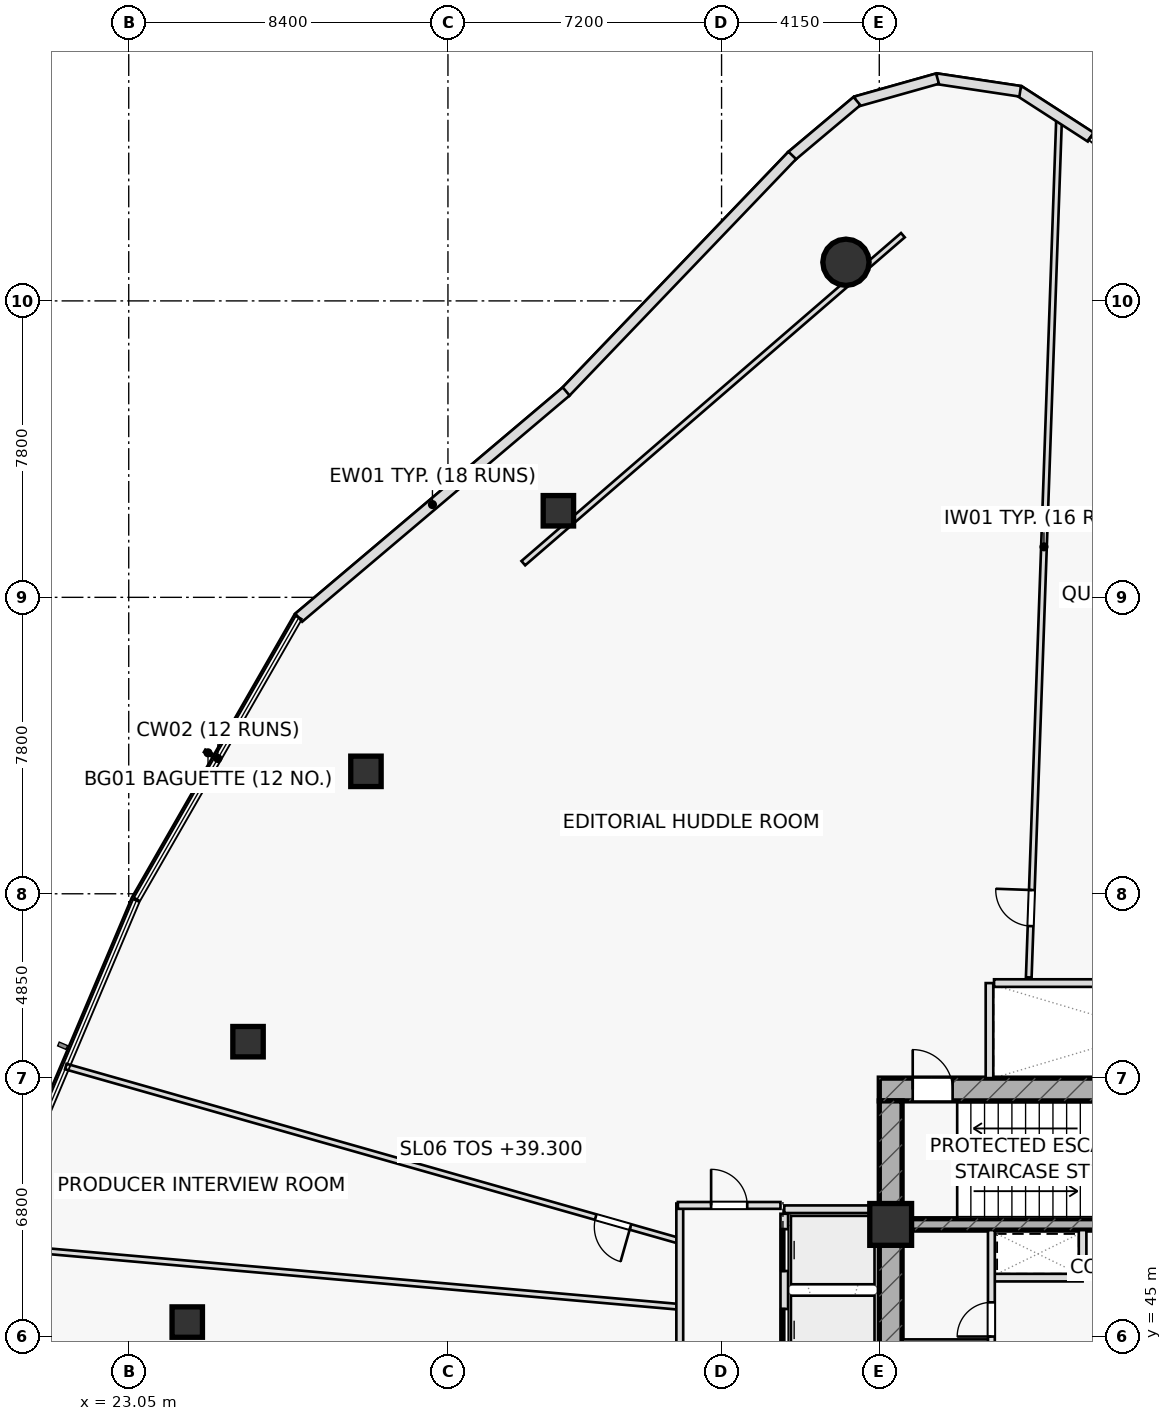
"""IFC4 building model, lengths in metres.
Left out: names, types, materials, properties, quantities, classifications, styles, units other than length and angle.
Written with IfcOpenShell. Run it as: python <this file> out.ifc"""

import sys

from ifc_helpers import new_model, si_unit, direction, frame, frame_2d, origin, origin_2d, place, context, subcontext, project, spatial, rectangle, hollow_rectangle, hollow_circle, extrude, element, fill, save


model = new_model("IFC4")
c1 = context("Model", 3, precision=1e-05, world=origin(), true_north=direction((0.0, 1.0)))
c2 = subcontext(c1, "Body", "Model", "MODEL_VIEW")
j1 = project(units=[si_unit("LENGTHUNIT", "METRE"), si_unit("PLANEANGLEUNIT", "RADIAN")], contexts=[c1])
p1 = place(None, origin())
s1 = spatial("IfcSite", under=j1, at=p1, CompositionType="ELEMENT")
p2 = place(p1, origin())
s2 = spatial("IfcBuilding", under=s1, at=p2, CompositionType="ELEMENT")
p3 = place(p2, frame((0.0, 0.0, 39.3)))
s3 = spatial("IfcBuildingStorey", under=s2, at=p3, CompositionType="ELEMENT", Elevation=39.3)
p4 = place(p3, frame((42.8, 51.5, 0.0), z_axis=(0.0, 0.0, 1.0), x_axis=(1.0, 0.0, 0.0)))
e1 = element("IfcWall", 1, at=p4, inside=s3, PredefinedType="SHEAR", context=c2, shape_type="SweptSolid", body=[
    extrude(rectangle(XDim=14.4, YDim=0.6, at=frame_2d((7.2, 0.0))), origin(), (0.0, 0.0, 1.0), 3.6),
])
p5 = place(p4, frame((0.88, 0.0, 0.0)))
e2 = element("IfcOpeningElement", 2, at=p5, cuts=e1, PredefinedType="OPENING", context=c2, shape_type="SweptSolid", body=[
    extrude(rectangle(XDim=1.05, YDim=2.2, at=frame_2d((0.525, 1.1))), frame((0.0, 0.31, 0.0), z_axis=(0.0, -1.0, 0.0), x_axis=(1.0, 0.0, 0.0)), (0.0, 0.0, 1.0), 0.62),
])
p6 = place(p3, frame((43.1, 38.8, 0.0), z_axis=(0.0, 0.0, 1.0), x_axis=(0.0, 1.0, 0.0)))
e3 = element("IfcWall", 3, at=p6, inside=s3, PredefinedType="SHEAR", context=c2, shape_type="SweptSolid", body=[
    extrude(rectangle(XDim=12.4, YDim=0.6, at=frame_2d((6.2, 0.0))), origin(), (0.0, 0.0, 1.0), 3.6),
])
p7 = place(p3, frame((43.4, 47.95, 0.0), z_axis=(0.0, 0.0, 1.0), x_axis=(1.0, 0.0, 0.0)))
e4 = element("IfcWall", 4, at=p7, inside=s3, PredefinedType="SHEAR", context=c2, shape_type="SweptSolid", body=[
    extrude(rectangle(XDim=13.2, YDim=0.3, at=frame_2d((6.6, 0.0))), origin(), (0.0, 0.0, 1.0), 3.6),
])
p8 = place(p7, frame((8.345, 0.0, 0.0)))
e5 = element("IfcOpeningElement", 5, at=p8, cuts=e4, PredefinedType="OPENING", context=c2, shape_type="SweptSolid", body=[
    extrude(rectangle(XDim=1.15, YDim=2.2, at=frame_2d((0.575, 1.1))), frame((0.0, 0.16, 0.0), z_axis=(0.0, -1.0, 0.0), x_axis=(1.0, 0.0, 0.0)), (0.0, 0.0, 1.0), 0.32),
])
p9 = place(p7, frame((10.065, 0.0, 0.0)))
e6 = element("IfcOpeningElement", 6, at=p9, cuts=e4, PredefinedType="OPENING", context=c2, shape_type="SweptSolid", body=[
    extrude(rectangle(XDim=1.15, YDim=2.2, at=frame_2d((0.575, 1.1))), frame((0.0, 0.16, 0.0), z_axis=(0.0, -1.0, 0.0), x_axis=(1.0, 0.0, 0.0)), (0.0, 0.0, 1.0), 0.32),
])
p10 = place(p7, frame((11.645, 0.0, 0.0)))
e7 = element("IfcOpeningElement", 7, at=p10, cuts=e4, PredefinedType="OPENING", context=c2, shape_type="SweptSolid", body=[
    extrude(rectangle(XDim=1.15, YDim=2.2, at=frame_2d((0.575, 1.1))), frame((0.0, 0.16, 0.0), z_axis=(0.0, -1.0, 0.0), x_axis=(1.0, 0.0, 0.0)), (0.0, 0.0, 1.0), 0.32),
])
p11 = place(p3, frame((43.1, 47.95, 0.0), z_axis=(0.0, 0.0, 1.0), x_axis=(1.0, 0.0, 0.0)))
e8 = element("IfcColumn", 8, at=p11, inside=s3, PredefinedType="COLUMN", context=c2, shape_type="SweptSolid", body=[
    extrude(rectangle(XDim=1.1, YDim=1.1, at=origin_2d()), origin(), (0.0, 0.0, 1.0), 3.6),
])
p12 = place(p3, frame((41.923, 73.266, 0.0), z_axis=(0.0, 0.0, 1.0), x_axis=(1.0, 0.0, 0.0)))
e9 = element("IfcColumn", 9, at=p12, inside=s3, PredefinedType="COLUMN", context=c2, shape_type="SweptSolid", body=[
    extrude(hollow_circle(Radius=0.61, WallThickness=0.05, at=origin_2d()), origin(), (0.0, 0.0, 1.0), 3.6),
])
for number, where, z_axis, x_axis in (
    (10, (34.356, 66.728, 0.0), (0.0, 0.0, 1.0), (1.0, 0.0, 0.0)),
    (11, (29.292, 59.872, 0.0), (0.0, 0.0, 1.0), (1.0, 0.0, 0.0)),
    (12, (26.189, 52.758, 0.0), (0.0, 0.0, 1.0), (1.0, 0.0, 0.0)),
    (13, (24.59, 45.381, 0.0), (0.0, 0.0, 1.0), (1.0, 0.0, 0.0)),
):
    element("IfcColumn", number, at=place(p3, frame(where, z_axis=z_axis, x_axis=x_axis)), inside=s3, PredefinedType="COLUMN", context=c2, shape_type="SweptSolid", body=[
        extrude(hollow_rectangle(XDim=0.8, YDim=0.8, WallThickness=0.045, at=origin_2d()), origin(), (0.0, 0.0, 1.0), 3.6),
    ])
for number, where, z_axis, x_axis in (
    (14, (40.3, 48.35, 0.0), (0.0, 0.0, 1.0), (1.0, 0.0, 0.0)),
    (15, (45.7, 51.8, 0.0), (0.0, 0.0, 1.0), (0.0, 1.0, 0.0)),
):
    element("IfcWall", number, at=place(p3, frame(where, z_axis=z_axis, x_axis=x_axis)), inside=s3, PredefinedType="PARTITIONING", context=c2, shape_type="SweptSolid", body=[
        extrude(rectangle(XDim=2.5, YDim=0.2, at=frame_2d((1.25, 0.0))), origin(), (0.0, 0.0, 1.0), 3.6),
    ])
p13 = place(p3, frame((45.75, 46.55, 0.0), z_axis=(0.0, 0.0, 1.0), x_axis=(1.0, 0.0, 0.0)))
e16 = element("IfcWall", 16, at=p13, inside=s3, PredefinedType="PARTITIONING", context=c2, shape_type="SweptSolid", body=[
    extrude(rectangle(XDim=2.4, YDim=0.2, at=frame_2d((1.2, 0.0))), origin(), (0.0, 0.0, 1.0), 3.6),
])
p14 = place(p3, frame((48.15, 46.55, 0.0), z_axis=(0.0, 0.0, 1.0), x_axis=(0.0, 1.0, 0.0)))
e17 = element("IfcWall", 17, at=p14, inside=s3, PredefinedType="PARTITIONING", context=c2, shape_type="SweptSolid", body=[
    extrude(rectangle(XDim=1.25, YDim=0.2, at=frame_2d((0.625, 0.0))), origin(), (0.0, 0.0, 1.0), 3.6),
])
p15 = place(p3, frame((43.4, 44.85, 0.0), z_axis=(0.0, 0.0, 1.0), x_axis=(1.0, 0.0, 0.0)))
e18 = element("IfcWall", 18, at=p15, inside=s3, PredefinedType="PARTITIONING", context=c2, shape_type="SweptSolid", body=[
    extrude(rectangle(XDim=2.35, YDim=0.15, at=frame_2d((1.175, 0.0))), origin(), (0.0, 0.0, 1.0), 3.6),
])
p16 = place(p3, frame((45.75, 42.2, 0.0), z_axis=(0.0, 0.0, 1.0), x_axis=(0.0, 1.0, 0.0)))
e19 = element("IfcWall", 19, at=p16, inside=s3, PredefinedType="PARTITIONING", context=c2, shape_type="SweptSolid", body=[
    extrude(rectangle(XDim=5.6, YDim=0.18, at=frame_2d((2.8, 0.0))), origin(), (0.0, 0.0, 1.0), 3.6),
])
p17 = place(p16, frame((0.42, 0.0, 0.0)))
e20 = element("IfcOpeningElement", 20, at=p17, cuts=e19, PredefinedType="OPENING", context=c2, shape_type="SweptSolid", body=[
    extrude(rectangle(XDim=0.85, YDim=2.05, at=frame_2d((0.425, 1.025))), frame((0.0, 0.1, 0.0), z_axis=(0.0, -1.0, 0.0), x_axis=(1.0, 0.0, 0.0)), (0.0, 0.0, 1.0), 0.2),
])
p18 = place(p16, frame((1.57, 0.0, 0.0)))
e21 = element("IfcOpeningElement", 21, at=p18, cuts=e19, PredefinedType="OPENING", context=c2, shape_type="SweptSolid", body=[
    extrude(rectangle(XDim=0.85, YDim=2.05, at=frame_2d((0.425, 1.025))), frame((0.0, 0.1, 0.0), z_axis=(0.0, -1.0, 0.0), x_axis=(1.0, 0.0, 0.0)), (0.0, 0.0, 1.0), 0.2),
])
p19 = place(p16, frame((2.8, 0.0, 0.0)))
e22 = element("IfcOpeningElement", 22, at=p19, cuts=e19, PredefinedType="OPENING", context=c2, shape_type="SweptSolid", body=[
    extrude(rectangle(XDim=0.9, YDim=2.05, at=frame_2d((0.45, 1.025))), frame((0.0, 0.1, 0.0), z_axis=(0.0, -1.0, 0.0), x_axis=(1.0, 0.0, 0.0)), (0.0, 0.0, 1.0), 0.2),
])
p20 = place(p3, frame((43.421, 73.979, 0.0), z_axis=(0.0, 0.0, 1.0), x_axis=(-0.756659135409, -0.653809569218, 0.0)))
e23 = element("IfcWall", 23, at=p20, inside=s3, PredefinedType="PARTITIONING", context=c2, shape_type="SweptSolid", body=[
    extrude(rectangle(XDim=13.2, YDim=0.15, at=frame_2d((6.6, 0.0))), origin(), (0.0, 0.0, 1.0), 2.925),
])
p21 = place(p3, frame((46.733, 54.45, 0.0), z_axis=(0.0, 0.0, 1.0), x_axis=(0.035277469933, 0.99937755634, 0.0)))
e24 = element("IfcWall", 24, at=p21, inside=s3, PredefinedType="PARTITIONING", context=c2, shape_type="SweptSolid", body=[
    extrude(rectangle(XDim=22.672, YDim=0.15, at=frame_2d((11.336, 0.0))), origin(), (0.0, 0.0, 1.0), 2.975),
])
p22 = place(p21, frame((1.35, 0.0, 0.0)))
e25 = element("IfcOpeningElement", 25, at=p22, cuts=e24, PredefinedType="OPENING", context=c2, shape_type="SweptSolid", body=[
    extrude(rectangle(XDim=0.95, YDim=2.05, at=frame_2d((0.475, 1.025))), frame((0.0, 0.085, 0.0), z_axis=(0.0, -1.0, 0.0), x_axis=(1.0, 0.0, 0.0)), (0.0, 0.0, 1.0), 0.17),
])
p23 = place(p3, frame((37.55, 47.514, 0.0), z_axis=(0.0, 0.0, 1.0), x_axis=(-0.96193153625, 0.273290540574, 0.0)))
e26 = element("IfcWall", 26, at=p23, inside=s3, PredefinedType="PARTITIONING", context=c2, shape_type="SweptSolid", body=[
    extrude(rectangle(XDim=16.796, YDim=0.15, at=frame_2d((8.398, 0.0))), origin(), (0.0, 0.0, 1.0), 2.925),
])
p24 = place(p23, frame((1.35, 0.0, 0.0)))
e27 = element("IfcOpeningElement", 27, at=p24, cuts=e26, PredefinedType="OPENING", context=c2, shape_type="SweptSolid", body=[
    extrude(rectangle(XDim=0.95, YDim=2.05, at=frame_2d((0.475, 1.025))), frame((0.0, 0.085, 0.0), z_axis=(0.0, -1.0, 0.0), x_axis=(1.0, 0.0, 0.0)), (0.0, 0.0, 1.0), 0.17),
])
p25 = place(p3, frame((37.55, 45.78, 0.0), z_axis=(0.0, 0.0, 1.0), x_axis=(-0.99613586072, 0.087825662467, 0.0)))
e28 = element("IfcWall", 28, at=p25, inside=s3, PredefinedType="PARTITIONING", context=c2, shape_type="SweptSolid", body=[
    extrude(rectangle(XDim=17.774, YDim=0.15, at=frame_2d((8.887, 0.0))), origin(), (0.0, 0.0, 1.0), 2.925),
])
p26 = place(p3, frame((37.55, 35.85, 0.0), z_axis=(0.0, 0.0, 1.0), x_axis=(0.0, 1.0, 0.0)))
e29 = element("IfcWall", 29, at=p26, inside=s3, PredefinedType="PARTITIONING", context=c2, shape_type="SweptSolid", body=[
    extrude(rectangle(XDim=12.65, YDim=0.18, at=frame_2d((6.325, 0.0))), origin(), (0.0, 0.0, 1.0), 2.925),
])
p27 = place(p26, frame((6.159, 0.0, 0.0)))
e30 = element("IfcOpeningElement", 30, at=p27, cuts=e29, PredefinedType="OPENING", context=c2, shape_type="SweptSolid", body=[
    extrude(rectangle(XDim=0.95, YDim=2.05, at=frame_2d((0.475, 1.025))), frame((0.0, 0.1, 0.0), z_axis=(0.0, -1.0, 0.0), x_axis=(1.0, 0.0, 0.0)), (0.0, 0.0, 1.0), 0.2),
])
p28 = place(p3, frame((37.5, 48.45, 0.0), z_axis=(0.0, 0.0, 1.0), x_axis=(1.0, 0.0, 0.0)))
e31 = element("IfcWall", 31, at=p28, inside=s3, PredefinedType="PARTITIONING", context=c2, shape_type="SweptSolid", body=[
    extrude(rectangle(XDim=2.7, YDim=0.18, at=frame_2d((1.35, 0.0))), origin(), (0.0, 0.0, 1.0), 3.6),
])
p29 = place(p28, frame((0.875, 0.0, 0.0)))
e32 = element("IfcOpeningElement", 32, at=p29, cuts=e31, PredefinedType="OPENING", context=c2, shape_type="SweptSolid", body=[
    extrude(rectangle(XDim=0.95, YDim=2.05, at=frame_2d((0.475, 1.025))), frame((0.0, 0.1, 0.0), z_axis=(0.0, -1.0, 0.0), x_axis=(1.0, 0.0, 0.0)), (0.0, 0.0, 1.0), 0.2),
])
p30 = place(p3, frame((48.363, 76.56, 0.0), z_axis=(0.0, 0.0, 1.0), x_axis=(-0.840072472412, 0.542474184727, 0.0)))
e33 = element("IfcWall", 33, at=p30, inside=s3, PredefinedType="STANDARD", context=c2, shape_type="SweptSolid", body=[
    extrude(rectangle(XDim=2.241, YDim=0.28, at=frame_2d((1.121, 0.0))), origin(), (0.0, 0.0, 1.0), 3.6),
])
p31 = place(p3, frame((46.508, 77.765, 0.0), z_axis=(0.0, 0.0, 1.0), x_axis=(-0.988882475494, 0.148699191864, 0.0)))
e34 = element("IfcWall", 34, at=p31, inside=s3, PredefinedType="STANDARD", context=c2, shape_type="SweptSolid", body=[
    extrude(rectangle(XDim=2.23, YDim=0.28, at=frame_2d((1.115, 0.0))), origin(), (0.0, 0.0, 1.0), 3.6),
])
p32 = place(p3, frame((44.332, 78.098, 0.0), z_axis=(0.0, 0.0, 1.0), x_axis=(-0.962476815064, -0.271363926241, 0.0)))
e35 = element("IfcWall", 35, at=p32, inside=s3, PredefinedType="STANDARD", context=c2, shape_type="SweptSolid", body=[
    extrude(rectangle(XDim=2.229, YDim=0.28, at=frame_2d((1.115, 0.0))), origin(), (0.0, 0.0, 1.0), 3.6),
])
p33 = place(p3, frame((42.212, 77.507, 0.0), z_axis=(0.0, 0.0, 1.0), x_axis=(-0.765450672615, -0.643494574797, 0.0)))
e36 = element("IfcWall", 36, at=p33, inside=s3, PredefinedType="STANDARD", context=c2, shape_type="SweptSolid", body=[
    extrude(rectangle(XDim=2.252, YDim=0.28, at=frame_2d((1.126, 0.0))), origin(), (0.0, 0.0, 1.0), 3.6),
])
p34 = place(p3, frame((40.51, 76.078, 0.0), z_axis=(0.0, 0.0, 1.0), x_axis=(-0.691854983752, -0.722036482082, 0.0)))
e37 = element("IfcWall", 37, at=p34, inside=s3, PredefinedType="STANDARD", context=c2, shape_type="SweptSolid", body=[
    extrude(rectangle(XDim=8.631, YDim=0.28, at=frame_2d((4.315, 0.0))), origin(), (0.0, 0.0, 1.0), 3.6),
])
p35 = place(p3, frame((34.561, 69.867, 0.0), z_axis=(0.0, 0.0, 1.0), x_axis=(-0.763530938184, -0.64577124931, 0.0)))
e38 = element("IfcWall", 38, at=p35, inside=s3, PredefinedType="STANDARD", context=c2, shape_type="SweptSolid", body=[
    extrude(rectangle(XDim=9.218, YDim=0.28, at=frame_2d((4.609, 0.0))), origin(), (0.0, 0.0, 1.0), 3.6),
])
p36 = place(p3, frame((40.3, 40.02, 0.0), z_axis=(0.0, 0.0, 1.0), x_axis=(0.0, 1.0, 0.0)))
e39 = element("IfcWall", 39, at=p36, inside=s3, PredefinedType="PARTITIONING", context=c2, shape_type="SweptSolid", body=[
    extrude(rectangle(XDim=8.21, YDim=0.2, at=frame_2d((4.105, 0.0))), origin(), (0.0, 0.0, 1.0), 3.6),
])
p37 = place(p36, frame((0.405, 0.0, 0.0)))
e40 = element("IfcOpeningElement", 40, at=p37, cuts=e39, PredefinedType="OPENING", context=c2, shape_type="SweptSolid", body=[
    extrude(rectangle(XDim=1.1, YDim=2.15, at=frame_2d((0.55, 1.075))), frame((0.0, 0.11, 0.0), z_axis=(0.0, -1.0, 0.0), x_axis=(1.0, 0.0, 0.0)), (0.0, 0.0, 1.0), 0.22),
])
p38 = place(p36, frame((2.505, 0.0, 0.0)))
e41 = element("IfcOpeningElement", 41, at=p38, cuts=e39, PredefinedType="OPENING", context=c2, shape_type="SweptSolid", body=[
    extrude(rectangle(XDim=1.1, YDim=2.15, at=frame_2d((0.55, 1.075))), frame((0.0, 0.11, 0.0), z_axis=(0.0, -1.0, 0.0), x_axis=(1.0, 0.0, 0.0)), (0.0, 0.0, 1.0), 0.22),
])
p39 = place(p36, frame((4.605, 0.0, 0.0)))
e42 = element("IfcOpeningElement", 42, at=p39, cuts=e39, PredefinedType="OPENING", context=c2, shape_type="SweptSolid", body=[
    extrude(rectangle(XDim=1.1, YDim=2.15, at=frame_2d((0.55, 1.075))), frame((0.0, 0.11, 0.0), z_axis=(0.0, -1.0, 0.0), x_axis=(1.0, 0.0, 0.0)), (0.0, 0.0, 1.0), 0.22),
])
p40 = place(p36, frame((6.705, 0.0, 0.0)))
e43 = element("IfcOpeningElement", 43, at=p40, cuts=e39, PredefinedType="OPENING", context=c2, shape_type="SweptSolid", body=[
    extrude(rectangle(XDim=1.1, YDim=2.15, at=frame_2d((0.55, 1.075))), frame((0.0, 0.11, 0.0), z_axis=(0.0, -1.0, 0.0), x_axis=(1.0, 0.0, 0.0)), (0.0, 0.0, 1.0), 0.22),
])
p41 = place(p3, frame((45.82, 54.3, 0.0), z_axis=(0.0, 0.0, 1.0), x_axis=(1.0, 0.0, 0.0)))
e44 = element("IfcWall", 44, at=p41, inside=s3, PredefinedType="PARTITIONING", context=c2, shape_type="SweptSolid", body=[
    extrude(rectangle(XDim=8.31, YDim=0.2, at=frame_2d((4.155, 0.0))), origin(), (0.0, 0.0, 1.0), 3.6),
])
p42 = place(p5, origin())
e45 = element("IfcDoor", 45, at=p42, inside=s3, OperationType="SINGLE_SWING_LEFT", PredefinedType="DOOR", context=c2, shape_type="SweptSolid", body=[
    extrude(rectangle(XDim=1.05, YDim=2.2, at=frame_2d((0.525, 1.1))), frame((0.0, 0.025, 0.0), z_axis=(0.0, -1.0, 0.0), x_axis=(1.0, 0.0, 0.0)), (0.0, 0.0, 1.0), 0.05),
])
fill(e2, e45)
p43 = place(p19, origin())
e46 = element("IfcDoor", 46, at=p43, inside=s3, OperationType="SINGLE_SWING_LEFT", PredefinedType="DOOR", context=c2, shape_type="SweptSolid", body=[
    extrude(rectangle(XDim=0.9, YDim=2.05, at=frame_2d((0.45, 1.025))), frame((0.0, 0.025, 0.0), z_axis=(0.0, -1.0, 0.0), x_axis=(1.0, 0.0, 0.0)), (0.0, 0.0, 1.0), 0.05),
])
fill(e22, e46)
p44 = place(p22, origin())
e47 = element("IfcDoor", 47, at=p44, inside=s3, OperationType="SINGLE_SWING_RIGHT", PredefinedType="DOOR", context=c2, shape_type="SweptSolid", body=[
    extrude(rectangle(XDim=0.95, YDim=2.05, at=frame_2d((0.475, 1.025))), frame((0.0, 0.025, 0.0), z_axis=(0.0, -1.0, 0.0), x_axis=(1.0, 0.0, 0.0)), (0.0, 0.0, 1.0), 0.05),
])
fill(e25, e47)
p45 = place(p24, origin())
e48 = element("IfcDoor", 48, at=p45, inside=s3, OperationType="SINGLE_SWING_LEFT", PredefinedType="DOOR", context=c2, shape_type="SweptSolid", body=[
    extrude(rectangle(XDim=0.95, YDim=2.05, at=frame_2d((0.475, 1.025))), frame((0.0, 0.025, 0.0), z_axis=(0.0, -1.0, 0.0), x_axis=(1.0, 0.0, 0.0)), (0.0, 0.0, 1.0), 0.05),
])
fill(e27, e48)
p46 = place(p29, origin())
e49 = element("IfcDoor", 49, at=p46, inside=s3, OperationType="SINGLE_SWING_LEFT", PredefinedType="DOOR", context=c2, shape_type="SweptSolid", body=[
    extrude(rectangle(XDim=0.95, YDim=2.05, at=frame_2d((0.475, 1.025))), frame((0.0, 0.025, 0.0), z_axis=(0.0, -1.0, 0.0), x_axis=(1.0, 0.0, 0.0)), (0.0, 0.0, 1.0), 0.05),
])
fill(e32, e49)
p47 = place(p39, origin())
e50 = element("IfcDoor", 50, at=p47, inside=s3, OperationType="SLIDING_TO_LEFT", PredefinedType="DOOR", context=c2, shape_type="SweptSolid", body=[
    extrude(rectangle(XDim=1.1, YDim=2.15, at=frame_2d((0.55, 1.075))), frame((0.0, 0.025, 0.0), z_axis=(0.0, -1.0, 0.0), x_axis=(1.0, 0.0, 0.0)), (0.0, 0.0, 1.0), 0.05),
])
fill(e42, e50)
p48 = place(p40, origin())
e51 = element("IfcDoor", 51, at=p48, inside=s3, OperationType="SLIDING_TO_RIGHT", PredefinedType="DOOR", context=c2, shape_type="SweptSolid", body=[
    extrude(rectangle(XDim=1.1, YDim=2.15, at=frame_2d((0.55, 1.075))), frame((0.0, 0.025, 0.0), z_axis=(0.0, -1.0, 0.0), x_axis=(1.0, 0.0, 0.0)), (0.0, 0.0, 1.0), 0.05),
])
fill(e43, e51)
save(model, sys.argv[1])
